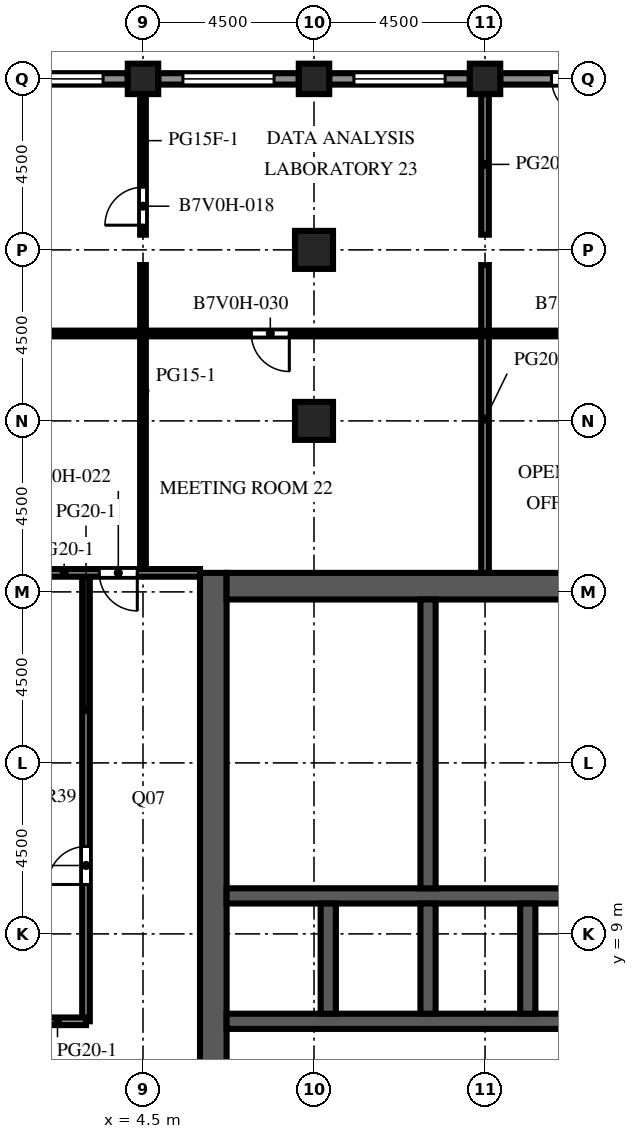
"""IFC4 building model, lengths in metres.
Left out: names, types, materials, properties, quantities, classifications, styles, units other than length and angle.
Written with IfcOpenShell. Run it as: python <this file> out.ifc"""

import sys

from ifc_helpers import new_model, si_unit, direction, frame, frame_2d, origin, origin_2d, place, context, subcontext, project, spatial, rectangle, extrude, element, fill, save


model = new_model("IFC4")
c1 = context("Model", 3, precision=1e-05, world=origin(), true_north=direction((0.0, 1.0)))
c2 = subcontext(c1, "Body", "Model", "MODEL_VIEW")
j1 = project(units=[si_unit("LENGTHUNIT", "METRE"), si_unit("PLANEANGLEUNIT", "RADIAN")], contexts=[c1])
p1 = place(None, origin())
s1 = spatial("IfcSite", under=j1, at=p1, CompositionType="ELEMENT")
p2 = place(p1, origin())
s2 = spatial("IfcBuilding", under=s1, at=p2, CompositionType="ELEMENT")
p3 = place(p2, frame((0.0, 0.0, 231.6)))
s3 = spatial("IfcBuildingStorey", under=s2, at=p3, CompositionType="ELEMENT", Elevation=231.6)
for number, where, z_axis, x_axis in (
    (1, (4.5, 31.5, -0.45), (0.0, 0.0, 1.0), (1.0, 0.0, 0.0)),
    (2, (9.0, 31.5, -0.45), (0.0, 0.0, 1.0), (1.0, 0.0, 0.0)),
    (3, (13.5, 31.5, -0.45), (0.0, 0.0, 1.0), (1.0, 0.0, 0.0)),
):
    element("IfcColumn", number, at=place(p3, frame(where, z_axis=z_axis, x_axis=x_axis)), inside=s3, PredefinedType="COLUMN", context=c2, shape_type="SweptSolid", body=[
        extrude(rectangle(XDim=0.8, YDim=0.8, at=origin_2d()), origin(), (0.0, 0.0, 1.0), 4.55),
    ])
for number, where, z_axis, x_axis in (
    (4, (9.0, 22.5, -0.45), (0.0, 0.0, 1.0), (1.0, 0.0, 0.0)),
    (5, (9.0, 27.0, -0.45), (0.0, 0.0, 1.0), (1.0, 0.0, 0.0)),
):
    element("IfcColumn", number, at=place(p3, frame(where, z_axis=z_axis, x_axis=x_axis)), inside=s3, PredefinedType="COLUMN", context=c2, shape_type="SweptSolid", body=[
        extrude(rectangle(XDim=1.0, YDim=1.0, at=origin_2d()), origin(), (0.0, 0.0, 1.0), 4.55),
    ])
p4 = place(p3, frame((6.35, -9.0, 0.0), z_axis=(0.0, 0.0, 1.0), x_axis=(0.0, 1.0, 0.0)))
e6 = element("IfcWall", 6, at=p4, inside=s3, PredefinedType="SHEAR", context=c2, shape_type="SweptSolid", body=[
    extrude(rectangle(XDim=27.5, YDim=0.7, at=frame_2d((13.75, 0.0))), origin(), (0.0, 0.0, 1.0), 4.1),
])
p5 = place(p4, frame((12.55, 0.0, 0.0)))
e7 = element("IfcOpeningElement", 7, at=p5, cuts=e6, PredefinedType="OPENING", context=c2, shape_type="SweptSolid", body=[
    extrude(rectangle(XDim=2.4, YDim=2.4, at=frame_2d((1.2, 1.2))), frame((0.0, 0.36, 0.0), z_axis=(0.0, -1.0, 0.0), x_axis=(1.0, 0.0, 0.0)), (0.0, 0.0, 1.0), 0.72),
])
p6 = place(p4, frame((5.42, 0.0, 0.0)))
e8 = element("IfcOpeningElement", 8, at=p6, cuts=e6, PredefinedType="OPENING", context=c2, shape_type="SweptSolid", body=[
    extrude(rectangle(XDim=1.2, YDim=2.1, at=frame_2d((0.6, 1.05))), frame((0.0, 0.36, 0.0), z_axis=(0.0, -1.0, 0.0), x_axis=(1.0, 0.0, 0.0)), (0.0, 0.0, 1.0), 0.72),
])
p7 = place(p4, frame((19.46, 0.0, 0.0)))
e9 = element("IfcOpeningElement", 9, at=p7, cuts=e6, PredefinedType="OPENING", context=c2, shape_type="SweptSolid", body=[
    extrude(rectangle(XDim=1.0, YDim=2.1, at=frame_2d((0.5, 1.05))), frame((0.0, 0.36, 0.0), z_axis=(0.0, -1.0, 0.0), x_axis=(1.0, 0.0, 0.0)), (0.0, 0.0, 1.0), 0.72),
])
p8 = place(p4, frame((21.17, 0.0, 0.0)))
e10 = element("IfcOpeningElement", 10, at=p8, cuts=e6, PredefinedType="OPENING", context=c2, shape_type="SweptSolid", body=[
    extrude(rectangle(XDim=1.0, YDim=2.1, at=frame_2d((0.5, 1.05))), frame((0.0, 0.36, 0.0), z_axis=(0.0, -1.0, 0.0), x_axis=(1.0, 0.0, 0.0)), (0.0, 0.0, 1.0), 0.72),
])
p9 = place(p4, frame((23.26, 0.0, 0.0)))
e11 = element("IfcOpeningElement", 11, at=p9, cuts=e6, PredefinedType="OPENING", context=c2, shape_type="SweptSolid", body=[
    extrude(rectangle(XDim=1.0, YDim=2.1, at=frame_2d((0.5, 1.05))), frame((0.0, 0.36, 0.0), z_axis=(0.0, -1.0, 0.0), x_axis=(1.0, 0.0, 0.0)), (0.0, 0.0, 1.0), 0.72),
])
p10 = place(p4, frame((25.35, 0.0, 0.0)))
e12 = element("IfcOpeningElement", 12, at=p10, cuts=e6, PredefinedType="OPENING", context=c2, shape_type="SweptSolid", body=[
    extrude(rectangle(XDim=1.0, YDim=2.1, at=frame_2d((0.5, 1.05))), frame((0.0, 0.36, 0.0), z_axis=(0.0, -1.0, 0.0), x_axis=(1.0, 0.0, 0.0)), (0.0, 0.0, 1.0), 0.72),
])
p11 = place(p3, frame((6.7, 18.15, 0.0), z_axis=(0.0, 0.0, 1.0), x_axis=(1.0, 0.0, 0.0)))
e13 = element("IfcWall", 13, at=p11, inside=s3, PredefinedType="SHEAR", context=c2, shape_type="SweptSolid", body=[
    extrude(rectangle(XDim=10.6, YDim=0.7, at=frame_2d((5.3, 0.0))), origin(), (0.0, 0.0, 1.0), 4.1),
])
p12 = place(p3, frame((6.7, 6.7, 0.0), z_axis=(0.0, 0.0, 1.0), x_axis=(1.0, 0.0, 0.0)))
e14 = element("IfcWall", 14, at=p12, inside=s3, PredefinedType="SHEAR", context=c2, shape_type="SweptSolid", body=[
    extrude(rectangle(XDim=10.6, YDim=0.4, at=frame_2d((5.3, 0.0))), origin(), (0.0, 0.0, 1.0), 4.1),
])
p13 = place(p12, frame((3.438, 0.0, 0.0)))
e15 = element("IfcOpeningElement", 15, at=p13, cuts=e14, PredefinedType="OPENING", context=c2, shape_type="SweptSolid", body=[
    extrude(rectangle(XDim=1.1, YDim=2.1, at=frame_2d((0.55, 1.05))), frame((0.0, 0.21, 0.0), z_axis=(0.0, -1.0, 0.0), x_axis=(1.0, 0.0, 0.0)), (0.0, 0.0, 1.0), 0.42),
])
p14 = place(p12, frame((6.062, 0.0, 0.0)))
e16 = element("IfcOpeningElement", 16, at=p14, cuts=e14, PredefinedType="OPENING", context=c2, shape_type="SweptSolid", body=[
    extrude(rectangle(XDim=1.1, YDim=2.1, at=frame_2d((0.55, 1.05))), frame((0.0, 0.21, 0.0), z_axis=(0.0, -1.0, 0.0), x_axis=(1.0, 0.0, 0.0)), (0.0, 0.0, 1.0), 0.42),
])
p15 = place(p12, frame((8.812, 0.0, 0.0)))
e17 = element("IfcOpeningElement", 17, at=p15, cuts=e14, PredefinedType="OPENING", context=c2, shape_type="SweptSolid", body=[
    extrude(rectangle(XDim=1.1, YDim=2.1, at=frame_2d((0.55, 1.05))), frame((0.0, 0.21, 0.0), z_axis=(0.0, -1.0, 0.0), x_axis=(1.0, 0.0, 0.0)), (0.0, 0.0, 1.0), 0.42),
])
p16 = place(p12, frame((0.738, 0.0, 0.0)))
e18 = element("IfcOpeningElement", 18, at=p16, cuts=e14, PredefinedType="OPENING", context=c2, shape_type="SweptSolid", body=[
    extrude(rectangle(XDim=1.0, YDim=2.1, at=frame_2d((0.5, 1.05))), frame((0.0, 0.21, 0.0), z_axis=(0.0, -1.0, 0.0), x_axis=(1.0, 0.0, 0.0)), (0.0, 0.0, 1.0), 0.42),
])
p17 = place(p3, frame((6.7, 10.0, 0.0), z_axis=(0.0, 0.0, 1.0), x_axis=(1.0, 0.0, 0.0)))
e19 = element("IfcWall", 19, at=p17, inside=s3, PredefinedType="SHEAR", context=c2, shape_type="SweptSolid", body=[
    extrude(rectangle(XDim=10.6, YDim=0.4, at=frame_2d((5.3, 0.0))), origin(), (0.0, 0.0, 1.0), 4.1),
])
for number, where, z_axis, x_axis in (
    (20, (9.375, 6.9, 0.0), (0.0, 0.0, 1.0), (0.0, 1.0, 0.0)),
    (21, (12.0, 6.9, 0.0), (0.0, 0.0, 1.0), (0.0, 1.0, 0.0)),
    (22, (14.625, 6.9, 0.0), (0.0, 0.0, 1.0), (0.0, 1.0, 0.0)),
):
    element("IfcWall", number, at=place(p3, frame(where, z_axis=z_axis, x_axis=x_axis)), inside=s3, PredefinedType="SHEAR", context=c2, shape_type="SweptSolid", body=[
        extrude(rectangle(XDim=2.9, YDim=0.4, at=frame_2d((1.45, 0.0))), origin(), (0.0, 0.0, 1.0), 4.1),
    ])
p18 = place(p3, frame((12.0, 10.2, 0.0), z_axis=(0.0, 0.0, 1.0), x_axis=(0.0, 1.0, 0.0)))
e23 = element("IfcWall", 23, at=p18, inside=s3, PredefinedType="SHEAR", context=c2, shape_type="SweptSolid", body=[
    extrude(rectangle(XDim=7.6, YDim=0.4, at=frame_2d((3.8, 0.0))), origin(), (0.0, 0.0, 1.0), 4.1),
])
p19 = place(p3, frame((13.9, 31.5, 0.0), z_axis=(0.0, 0.0, 1.0), x_axis=(1.0, 0.0, 0.0)))
e24 = element("IfcWall", 24, at=p19, inside=s3, PredefinedType="SOLIDWALL", context=c2, shape_type="SweptSolid", body=[
    extrude(rectangle(XDim=3.7, YDim=0.3, at=frame_2d((1.85, 0.0))), origin(), (0.0, 0.0, 1.0), 2.85),
])
p20 = place(p19, frame((1.35, 0.0, 0.0)))
e25 = element("IfcOpeningElement", 25, at=p20, cuts=e24, PredefinedType="OPENING", context=c2, shape_type="SweptSolid", body=[
    extrude(rectangle(XDim=1.0, YDim=2.2, at=frame_2d((0.5, 1.1))), frame((0.0, 0.16, 0.0), z_axis=(0.0, -1.0, 0.0), x_axis=(1.0, 0.0, 0.0)), (0.0, 0.0, 1.0), 0.32),
])
p21 = place(p3, frame((9.4, 31.5, 0.0), z_axis=(0.0, 0.0, 1.0), x_axis=(1.0, 0.0, 0.0)))
e26 = element("IfcWall", 26, at=p21, inside=s3, PredefinedType="SOLIDWALL", context=c2, shape_type="SweptSolid", body=[
    extrude(rectangle(XDim=3.7, YDim=0.3, at=frame_2d((1.85, 0.0))), origin(), (0.0, 0.0, 1.0), 2.85),
])
p22 = place(p21, frame((0.65, 0.0, 0.8)))
e27 = element("IfcOpeningElement", 27, at=p22, cuts=e26, PredefinedType="OPENING", context=c2, shape_type="SweptSolid", body=[
    extrude(rectangle(XDim=2.4, YDim=1.7, at=frame_2d((1.2, 0.85))), frame((0.0, 0.16, 0.0), z_axis=(0.0, -1.0, 0.0), x_axis=(1.0, 0.0, 0.0)), (0.0, 0.0, 1.0), 0.32),
])
p23 = place(p3, frame((4.9, 31.5, 0.0), z_axis=(0.0, 0.0, 1.0), x_axis=(1.0, 0.0, 0.0)))
e28 = element("IfcWall", 28, at=p23, inside=s3, PredefinedType="SOLIDWALL", context=c2, shape_type="SweptSolid", body=[
    extrude(rectangle(XDim=3.7, YDim=0.3, at=frame_2d((1.85, 0.0))), origin(), (0.0, 0.0, 1.0), 2.85),
])
p24 = place(p23, frame((0.65, 0.0, 0.8)))
e29 = element("IfcOpeningElement", 29, at=p24, cuts=e28, PredefinedType="OPENING", context=c2, shape_type="SweptSolid", body=[
    extrude(rectangle(XDim=2.4, YDim=1.7, at=frame_2d((1.2, 0.85))), frame((0.0, 0.16, 0.0), z_axis=(0.0, -1.0, 0.0), x_axis=(1.0, 0.0, 0.0)), (0.0, 0.0, 1.0), 0.32),
])
p25 = place(p3, frame((0.4, 31.5, 0.0), z_axis=(0.0, 0.0, 1.0), x_axis=(1.0, 0.0, 0.0)))
e30 = element("IfcWall", 30, at=p25, inside=s3, PredefinedType="SOLIDWALL", context=c2, shape_type="SweptSolid", body=[
    extrude(rectangle(XDim=3.7, YDim=0.3, at=frame_2d((1.85, 0.0))), origin(), (0.0, 0.0, 1.0), 2.85),
])
p26 = place(p25, frame((0.65, 0.0, 0.8)))
e31 = element("IfcOpeningElement", 31, at=p26, cuts=e30, PredefinedType="OPENING", context=c2, shape_type="SweptSolid", body=[
    extrude(rectangle(XDim=2.4, YDim=1.7, at=frame_2d((1.2, 0.85))), frame((0.0, 0.16, 0.0), z_axis=(0.0, -1.0, 0.0), x_axis=(1.0, 0.0, 0.0)), (0.0, 0.0, 1.0), 0.32),
])
for number, where, z_axis, x_axis in (
    (32, (6.7, 11.72, 0.0), (0.0, 0.0, 1.0), (1.0, 0.0, 0.0)),
    (33, (6.7, 13.62, 0.0), (0.0, 0.0, 1.0), (1.0, 0.0, 0.0)),
    (34, (6.7, 15.9, 0.0), (0.0, 0.0, 1.0), (1.0, 0.0, 0.0)),
):
    element("IfcWall", number, at=place(p3, frame(where, z_axis=z_axis, x_axis=x_axis)), inside=s3, PredefinedType="PARTITIONING", context=c2, shape_type="SweptSolid", body=[
        extrude(rectangle(XDim=5.1, YDim=0.1, at=frame_2d((2.55, 0.0))), origin(), (0.0, 0.0, 1.0), 3.65),
    ])
p27 = place(p3, frame((3.0, 6.7, 0.0), z_axis=(0.0, 0.0, 1.0), x_axis=(0.0, 1.0, 0.0)))
e35 = element("IfcWall", 35, at=p27, inside=s3, PredefinedType="PARTITIONING", context=c2, shape_type="SweptSolid", body=[
    extrude(rectangle(XDim=11.8, YDim=0.2, at=frame_2d((5.9, 0.0))), origin(), (0.0, 0.0, 1.0), 3.65),
])
p28 = place(p27, frame((3.6, 0.0, 0.0)))
e36 = element("IfcOpeningElement", 36, at=p28, cuts=e35, PredefinedType="OPENING", context=c2, shape_type="SweptSolid", body=[
    extrude(rectangle(XDim=1.0, YDim=2.1, at=frame_2d((0.5, 1.05))), frame((0.0, 0.11, 0.0), z_axis=(0.0, -1.0, 0.0), x_axis=(1.0, 0.0, 0.0)), (0.0, 0.0, 1.0), 0.22),
])
p29 = place(p3, frame((4.5, 18.5, 0.0), z_axis=(0.0, 0.0, 1.0), x_axis=(0.0, 1.0, 0.0)))
e37 = element("IfcWall", 37, at=p29, inside=s3, PredefinedType="PARTITIONING", context=c2, shape_type="SweptSolid", body=[
    extrude(rectangle(XDim=8.1, YDim=0.15, at=frame_2d((4.05, 0.0))), origin(), (0.0, 0.0, 1.0), 3.65),
])
p30 = place(p3, frame((4.5, 31.1, 0.0), z_axis=(0.0, 0.0, 1.0), x_axis=(0.0, -1.0, 0.0)))
e38 = element("IfcWall", 38, at=p30, inside=s3, PredefinedType="PARTITIONING", context=c2, shape_type="SweptSolid", body=[
    extrude(rectangle(XDim=3.7, YDim=0.15, at=frame_2d((1.85, 0.0))), origin(), (0.0, 0.0, 1.0), 3.65),
])
p31 = place(p30, frame((2.45, 0.0, 0.0)))
e39 = element("IfcOpeningElement", 39, at=p31, cuts=e38, PredefinedType="OPENING", context=c2, shape_type="SweptSolid", body=[
    extrude(rectangle(XDim=1.0, YDim=2.1, at=frame_2d((0.5, 1.05))), frame((0.0, 0.085, 0.0), z_axis=(0.0, -1.0, 0.0), x_axis=(1.0, 0.0, 0.0)), (0.0, 0.0, 1.0), 0.17),
])
p32 = place(p3, frame((13.5, 18.5, 0.0), z_axis=(0.0, 0.0, 1.0), x_axis=(0.0, 1.0, 0.0)))
e40 = element("IfcWall", 40, at=p32, inside=s3, PredefinedType="PARTITIONING", context=c2, shape_type="SweptSolid", body=[
    extrude(rectangle(XDim=8.1, YDim=0.2, at=frame_2d((4.05, 0.0))), origin(), (0.0, 0.0, 1.0), 3.65),
])
p33 = place(p3, frame((13.5, 27.4, 0.0), z_axis=(0.0, 0.0, 1.0), x_axis=(0.0, 1.0, 0.0)))
e41 = element("IfcWall", 41, at=p33, inside=s3, PredefinedType="PARTITIONING", context=c2, shape_type="SweptSolid", body=[
    extrude(rectangle(XDim=3.7, YDim=0.2, at=frame_2d((1.85, 0.0))), origin(), (0.0, 0.0, 1.0), 3.65),
])
p34 = place(p3, frame((1.5, 6.7, 0.0), z_axis=(0.0, 0.0, 1.0), x_axis=(1.0, 0.0, 0.0)))
e42 = element("IfcWall", 42, at=p34, inside=s3, PredefinedType="PARTITIONING", context=c2, shape_type="SweptSolid", body=[
    extrude(rectangle(XDim=1.5, YDim=0.2, at=frame_2d((0.75, 0.0))), origin(), (0.0, 0.0, 1.0), 3.65),
])
p35 = place(p3, frame((1.5, 18.5, 0.0), z_axis=(0.0, 0.0, 1.0), x_axis=(1.0, 0.0, 0.0)))
e43 = element("IfcWall", 43, at=p35, inside=s3, PredefinedType="PARTITIONING", context=c2, shape_type="SweptSolid", body=[
    extrude(rectangle(XDim=4.5, YDim=0.2, at=frame_2d((2.25, 0.0))), origin(), (0.0, 0.0, 1.0), 3.65),
])
p36 = place(p35, frame((1.85, 0.0, 0.0)))
e44 = element("IfcOpeningElement", 44, at=p36, cuts=e43, PredefinedType="OPENING", context=c2, shape_type="SweptSolid", body=[
    extrude(rectangle(XDim=1.0, YDim=2.1, at=frame_2d((0.5, 1.05))), frame((0.0, 0.11, 0.0), z_axis=(0.0, -1.0, 0.0), x_axis=(1.0, 0.0, 0.0)), (0.0, 0.0, 1.0), 0.22),
])
p37 = place(p3, frame((-13.5, 24.8, 0.0), z_axis=(0.0, 0.0, 1.0), x_axis=(1.0, 0.0, 0.0)))
e45 = element("IfcWall", 45, at=p37, inside=s3, PredefinedType="PARTITIONING", context=c2, shape_type="SweptSolid", body=[
    extrude(rectangle(XDim=34.5, YDim=0.15, at=frame_2d((17.25, 0.0))), origin(), (0.0, 0.0, 1.0), 3.65),
])
p38 = place(p37, frame((1.35, 0.0, 0.0)))
e46 = element("IfcOpeningElement", 46, at=p38, cuts=e45, PredefinedType="OPENING", context=c2, shape_type="SweptSolid", body=[
    extrude(rectangle(XDim=1.0, YDim=2.1, at=frame_2d((0.5, 1.05))), frame((0.0, 0.085, 0.0), z_axis=(0.0, -1.0, 0.0), x_axis=(1.0, 0.0, 0.0)), (0.0, 0.0, 1.0), 0.17),
])
p39 = place(p37, frame((12.0, 0.0, 0.0)))
e47 = element("IfcOpeningElement", 47, at=p39, cuts=e45, PredefinedType="OPENING", context=c2, shape_type="SweptSolid", body=[
    extrude(rectangle(XDim=1.0, YDim=2.1, at=frame_2d((0.5, 1.05))), frame((0.0, 0.085, 0.0), z_axis=(0.0, -1.0, 0.0), x_axis=(1.0, 0.0, 0.0)), (0.0, 0.0, 1.0), 0.17),
])
p40 = place(p37, frame((20.85, 0.0, 0.0)))
e48 = element("IfcOpeningElement", 48, at=p40, cuts=e45, PredefinedType="OPENING", context=c2, shape_type="SweptSolid", body=[
    extrude(rectangle(XDim=1.0, YDim=2.1, at=frame_2d((0.5, 1.05))), frame((0.0, 0.085, 0.0), z_axis=(0.0, -1.0, 0.0), x_axis=(1.0, 0.0, 0.0)), (0.0, 0.0, 1.0), 0.17),
])
p41 = place(p37, frame((29.85, 0.0, 0.0)))
e49 = element("IfcOpeningElement", 49, at=p41, cuts=e45, PredefinedType="OPENING", context=c2, shape_type="SweptSolid", body=[
    extrude(rectangle(XDim=1.0, YDim=2.1, at=frame_2d((0.5, 1.05))), frame((0.0, 0.085, 0.0), z_axis=(0.0, -1.0, 0.0), x_axis=(1.0, 0.0, 0.0)), (0.0, 0.0, 1.0), 0.17),
])
p42 = place(p20, origin())
e50 = element("IfcDoor", 50, at=p42, inside=s3, OperationType="SINGLE_SWING_RIGHT", PredefinedType="DOOR", context=c2, shape_type="SweptSolid", body=[
    extrude(rectangle(XDim=1.0, YDim=2.2, at=frame_2d((0.5, 1.1))), frame((0.0, 0.025, 0.0), z_axis=(0.0, -1.0, 0.0), x_axis=(1.0, 0.0, 0.0)), (0.0, 0.0, 1.0), 0.05),
])
fill(e25, e50)
p43 = place(p22, origin())
e51 = element("IfcWindow", 51, at=p43, inside=s3, PartitioningType="SINGLE_PANEL", PredefinedType="WINDOW", context=c2, shape_type="SweptSolid", body=[
    extrude(rectangle(XDim=2.4, YDim=1.7, at=frame_2d((1.2, 0.85))), frame((0.0, 0.03, 0.0), z_axis=(0.0, -1.0, 0.0), x_axis=(1.0, 0.0, 0.0)), (0.0, 0.0, 1.0), 0.06),
])
fill(e27, e51)
p44 = place(p24, origin())
e52 = element("IfcWindow", 52, at=p44, inside=s3, PartitioningType="SINGLE_PANEL", PredefinedType="WINDOW", context=c2, shape_type="SweptSolid", body=[
    extrude(rectangle(XDim=2.4, YDim=1.7, at=frame_2d((1.2, 0.85))), frame((0.0, 0.03, 0.0), z_axis=(0.0, -1.0, 0.0), x_axis=(1.0, 0.0, 0.0)), (0.0, 0.0, 1.0), 0.06),
])
fill(e29, e52)
p45 = place(p26, origin())
e53 = element("IfcWindow", 53, at=p45, inside=s3, PartitioningType="SINGLE_PANEL", PredefinedType="WINDOW", context=c2, shape_type="SweptSolid", body=[
    extrude(rectangle(XDim=2.4, YDim=1.7, at=frame_2d((1.2, 0.85))), frame((0.0, 0.03, 0.0), z_axis=(0.0, -1.0, 0.0), x_axis=(1.0, 0.0, 0.0)), (0.0, 0.0, 1.0), 0.06),
])
fill(e31, e53)
p46 = place(p13, origin())
e54 = element("IfcDoor", 54, at=p46, inside=s3, OperationType="DOUBLE_DOOR_SLIDING", PredefinedType="DOOR", context=c2, shape_type="SweptSolid", body=[
    extrude(rectangle(XDim=1.1, YDim=2.1, at=frame_2d((0.55, 1.05))), frame((0.0, 0.025, 0.0), z_axis=(0.0, -1.0, 0.0), x_axis=(1.0, 0.0, 0.0)), (0.0, 0.0, 1.0), 0.05),
])
fill(e15, e54)
p47 = place(p14, origin())
e55 = element("IfcDoor", 55, at=p47, inside=s3, OperationType="DOUBLE_DOOR_SLIDING", PredefinedType="DOOR", context=c2, shape_type="SweptSolid", body=[
    extrude(rectangle(XDim=1.1, YDim=2.1, at=frame_2d((0.55, 1.05))), frame((0.0, 0.025, 0.0), z_axis=(0.0, -1.0, 0.0), x_axis=(1.0, 0.0, 0.0)), (0.0, 0.0, 1.0), 0.05),
])
fill(e16, e55)
p48 = place(p5, origin())
e56 = element("IfcDoor", 56, at=p48, inside=s3, OperationType="DOUBLE_DOOR_DOUBLE_SWING", PredefinedType="DOOR", context=c2, shape_type="SweptSolid", body=[
    extrude(rectangle(XDim=2.4, YDim=2.4, at=frame_2d((1.2, 1.2))), frame((0.0, 0.025, 0.0), z_axis=(0.0, -1.0, 0.0), x_axis=(1.0, 0.0, 0.0)), (0.0, 0.0, 1.0), 0.05),
])
fill(e7, e56)
p49 = place(p16, origin())
e57 = element("IfcDoor", 57, at=p49, inside=s3, OperationType="SINGLE_SWING_LEFT", PredefinedType="DOOR", context=c2, shape_type="SweptSolid", body=[
    extrude(rectangle(XDim=1.0, YDim=2.1, at=frame_2d((0.5, 1.05))), frame((0.0, 0.025, 0.0), z_axis=(0.0, -1.0, 0.0), x_axis=(1.0, 0.0, 0.0)), (0.0, 0.0, 1.0), 0.05),
])
fill(e18, e57)
p50 = place(p7, origin())
e58 = element("IfcDoor", 58, at=p50, inside=s3, OperationType="SINGLE_SWING_RIGHT", PredefinedType="DOOR", context=c2, shape_type="SweptSolid", body=[
    extrude(rectangle(XDim=1.0, YDim=2.1, at=frame_2d((0.5, 1.05))), frame((0.0, -0.275, 0.0), z_axis=(0.0, -1.0, 0.0), x_axis=(1.0, 0.0, 0.0)), (0.0, 0.0, 1.0), 0.05),
])
fill(e9, e58)
p51 = place(p8, origin())
e59 = element("IfcDoor", 59, at=p51, inside=s3, OperationType="SINGLE_SWING_LEFT", PredefinedType="DOOR", context=c2, shape_type="SweptSolid", body=[
    extrude(rectangle(XDim=1.0, YDim=2.1, at=frame_2d((0.5, 1.05))), frame((0.0, -0.275, 0.0), z_axis=(0.0, -1.0, 0.0), x_axis=(1.0, 0.0, 0.0)), (0.0, 0.0, 1.0), 0.05),
])
fill(e10, e59)
p52 = place(p9, origin())
e60 = element("IfcDoor", 60, at=p52, inside=s3, OperationType="SINGLE_SWING_RIGHT", PredefinedType="DOOR", context=c2, shape_type="SweptSolid", body=[
    extrude(rectangle(XDim=1.0, YDim=2.1, at=frame_2d((0.5, 1.05))), frame((0.0, -0.275, 0.0), z_axis=(0.0, -1.0, 0.0), x_axis=(1.0, 0.0, 0.0)), (0.0, 0.0, 1.0), 0.05),
])
fill(e11, e60)
p53 = place(p10, origin())
e61 = element("IfcDoor", 61, at=p53, inside=s3, OperationType="SINGLE_SWING_LEFT", PredefinedType="DOOR", context=c2, shape_type="SweptSolid", body=[
    extrude(rectangle(XDim=1.0, YDim=2.1, at=frame_2d((0.5, 1.05))), frame((0.0, -0.275, 0.0), z_axis=(0.0, -1.0, 0.0), x_axis=(1.0, 0.0, 0.0)), (0.0, 0.0, 1.0), 0.05),
])
fill(e12, e61)
p54 = place(p28, origin())
e62 = element("IfcDoor", 62, at=p54, inside=s3, OperationType="SINGLE_SWING_LEFT", PredefinedType="DOOR", context=c2, shape_type="SweptSolid", body=[
    extrude(rectangle(XDim=1.0, YDim=2.1, at=frame_2d((0.5, 1.05))), frame((0.0, 0.025, 0.0), z_axis=(0.0, -1.0, 0.0), x_axis=(1.0, 0.0, 0.0)), (0.0, 0.0, 1.0), 0.05),
])
fill(e36, e62)
p55 = place(p31, origin())
e63 = element("IfcDoor", 63, at=p55, inside=s3, OperationType="SINGLE_SWING_RIGHT", PredefinedType="DOOR", context=c2, shape_type="SweptSolid", body=[
    extrude(rectangle(XDim=1.0, YDim=2.1, at=frame_2d((0.5, 1.05))), frame((0.0, 0.025, 0.0), z_axis=(0.0, -1.0, 0.0), x_axis=(1.0, 0.0, 0.0)), (0.0, 0.0, 1.0), 0.05),
])
fill(e39, e63)
p56 = place(p36, origin())
e64 = element("IfcDoor", 64, at=p56, inside=s3, OperationType="SINGLE_SWING_RIGHT", PredefinedType="DOOR", context=c2, shape_type="SweptSolid", body=[
    extrude(rectangle(XDim=1.0, YDim=2.1, at=frame_2d((0.5, 1.05))), frame((0.0, 0.025, 0.0), z_axis=(0.0, -1.0, 0.0), x_axis=(1.0, 0.0, 0.0)), (0.0, 0.0, 1.0), 0.05),
])
fill(e44, e64)
p57 = place(p40, origin())
e65 = element("IfcDoor", 65, at=p57, inside=s3, OperationType="SINGLE_SWING_RIGHT", PredefinedType="DOOR", context=c2, shape_type="SweptSolid", body=[
    extrude(rectangle(XDim=1.0, YDim=2.1, at=frame_2d((0.5, 1.05))), frame((0.0, 0.025, 0.0), z_axis=(0.0, -1.0, 0.0), x_axis=(1.0, 0.0, 0.0)), (0.0, 0.0, 1.0), 0.05),
])
fill(e48, e65)
save(model, sys.argv[1])
